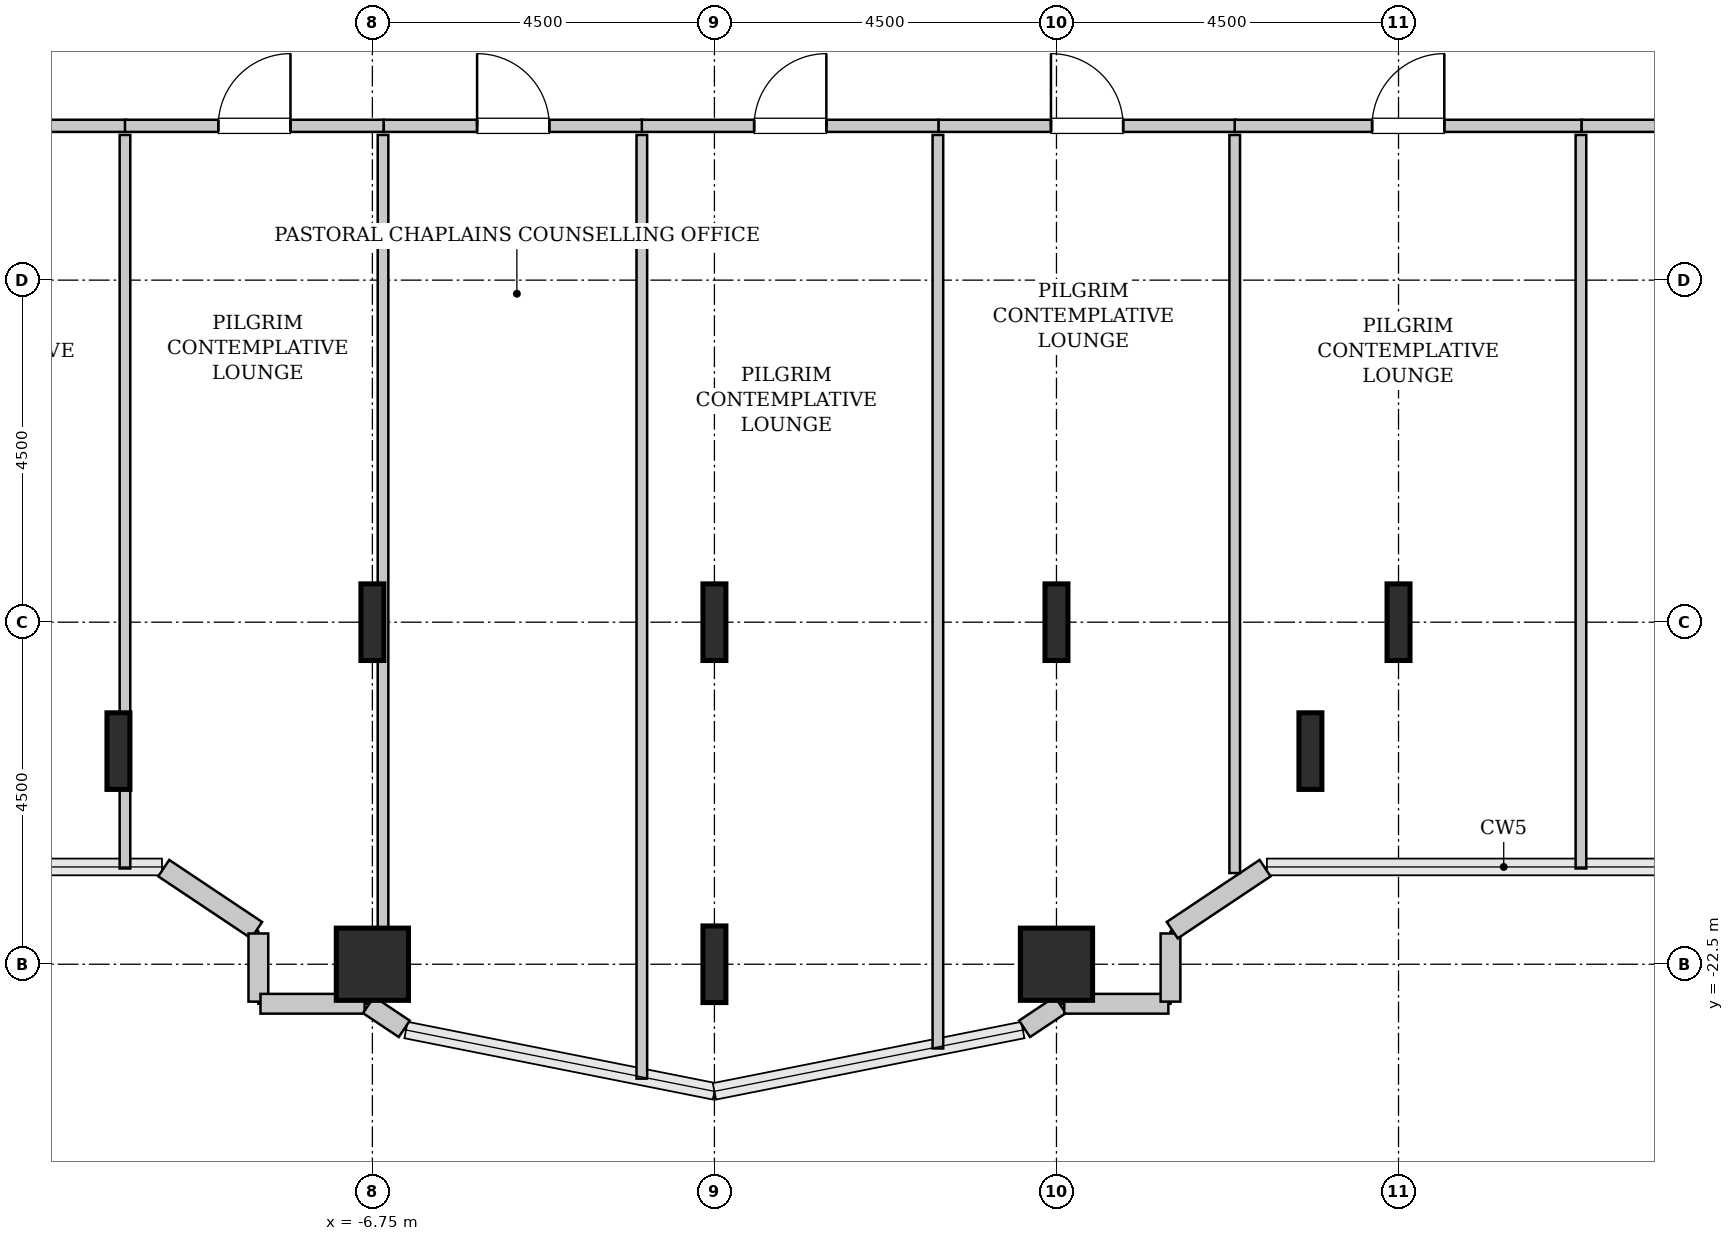
"""IFC4 building model, lengths in metres.
Left out: names, types, materials, properties, quantities, classifications, styles, units other than length and angle.
Written with IfcOpenShell. Run it as: python <this file> out.ifc"""

import sys

from ifc_helpers import new_model, si_unit, direction, frame, frame_2d, origin, origin_2d, place, context, subcontext, project, spatial, rectangle, hollow_rectangle, i_section, extrude, source, transform, mapped, element, fill, save


model = new_model("IFC4")
c1 = context("Model", 3, precision=1e-05, world=origin(), true_north=direction((0.0, 1.0)))
c2 = subcontext(c1, "Body", "Model", "MODEL_VIEW")
j1 = project(units=[si_unit("LENGTHUNIT", "METRE"), si_unit("PLANEANGLEUNIT", "RADIAN")], contexts=[c1])
p1 = place(None, origin())
s1 = spatial("IfcSite", under=j1, at=p1, CompositionType="ELEMENT")
p2 = place(p1, origin())
s2 = spatial("IfcBuilding", under=s1, at=p2, CompositionType="ELEMENT")
p3 = place(p2, frame((0.0, 0.0, 82.4)))
s3 = spatial("IfcBuildingStorey", under=s2, at=p3, CompositionType="ELEMENT", Elevation=82.4)
m1 = source(origin(), c2, "Body", "SweptSolid", [
    extrude(i_section(OverallWidth=0.302, OverallDepth=1.008, WebThickness=0.021, FlangeThickness=0.04, FilletRadius=0.03, at=origin_2d()), origin(), (0.0, 0.0, 1.0), 3.8),
])
p4 = place(p3, frame((-10.091, -19.696, 0.0), z_axis=(0.0, 0.0, 1.0), x_axis=(1.0, 0.0, 0.0)))
e1 = element("IfcColumn", 1, at=p4, inside=s3, PredefinedType="COLUMN", context=c2, shape_type="MappedRepresentation", body=[
    mapped(m1, transform((0.0, 0.0, 0.0), x_axis=(1.0, 0.0, 0.0), y_axis=(0.0, 1.0, 0.0), z_axis=(0.0, 0.0, 1.0), scale=1.0)),
])
m2 = source(origin(), c2, "Body", "SweptSolid", [
    extrude(hollow_rectangle(XDim=0.95, YDim=0.95, WallThickness=0.045, InnerFilletRadius=0.045, OuterFilletRadius=0.09, at=origin_2d()), origin(), (0.0, 0.0, 1.0), 3.8),
])
p5 = place(p3, frame((-6.75, -22.5, 0.0), z_axis=(0.0, 0.0, 1.0), x_axis=(1.0, 0.0, 0.0)))
e2 = element("IfcColumn", 2, at=p5, inside=s3, PredefinedType="COLUMN", context=c2, shape_type="MappedRepresentation", body=[
    mapped(m2, transform((0.0, 0.0, 0.0), x_axis=(1.0, 0.0, 0.0), y_axis=(0.0, 1.0, 0.0), z_axis=(0.0, 0.0, 1.0), scale=1.0)),
])
for number, where, z_axis, x_axis in (
    (3, (-6.75, -18.0, 0.0), (0.0, 0.0, 1.0), (1.0, 0.0, 0.0)),
    (4, (-2.25, -22.5, 0.0), (0.0, 0.0, 1.0), (1.0, 0.0, 0.0)),
    (5, (-2.25, -18.0, 0.0), (0.0, 0.0, 1.0), (1.0, 0.0, 0.0)),
):
    element("IfcColumn", number, at=place(p3, frame(where, z_axis=z_axis, x_axis=x_axis)), inside=s3, PredefinedType="COLUMN", context=c2, shape_type="MappedRepresentation", body=[
        mapped(m1, transform((0.0, 0.0, 0.0), x_axis=(1.0, 0.0, 0.0), y_axis=(0.0, 1.0, 0.0), z_axis=(0.0, 0.0, 1.0), scale=1.0)),
    ])
p6 = place(p3, frame((2.25, -22.5, 0.0), z_axis=(0.0, 0.0, 1.0), x_axis=(1.0, 0.0, 0.0)))
e6 = element("IfcColumn", 6, at=p6, inside=s3, PredefinedType="COLUMN", context=c2, shape_type="MappedRepresentation", body=[
    mapped(m2, transform((0.0, 0.0, 0.0), x_axis=(1.0, 0.0, 0.0), y_axis=(0.0, 1.0, 0.0), z_axis=(0.0, 0.0, 1.0), scale=1.0)),
])
for number, where, z_axis, x_axis in (
    (7, (2.25, -18.0, 0.0), (0.0, 0.0, 1.0), (1.0, 0.0, 0.0)),
    (8, (5.591, -19.696, 0.0), (0.0, 0.0, 1.0), (1.0, 0.0, 0.0)),
    (9, (6.75, -18.0, 0.0), (0.0, 0.0, 1.0), (1.0, 0.0, 0.0)),
):
    element("IfcColumn", number, at=place(p3, frame(where, z_axis=z_axis, x_axis=x_axis)), inside=s3, PredefinedType="COLUMN", context=c2, shape_type="MappedRepresentation", body=[
        mapped(m1, transform((0.0, 0.0, 0.0), x_axis=(1.0, 0.0, 0.0), y_axis=(0.0, 1.0, 0.0), z_axis=(0.0, 0.0, 1.0), scale=1.0)),
    ])
m3 = source(origin(), c2, "Body", "SweptSolid", [
    extrude(rectangle(XDim=1.469, YDim=0.26, at=frame_2d((0.734, 0.0))), origin(), (0.0, 0.0, 1.0), 3.5),
])
p7 = place(p3, frame((-9.495, -21.236, 0.0), z_axis=(0.0, 0.0, 1.0), x_axis=(0.831461760506, -0.555581983884, 0.0)))
e10 = element("IfcWall", 10, at=p7, inside=s3, PredefinedType="SOLIDWALL", context=c2, shape_type="MappedRepresentation", body=[
    mapped(m3, transform((0.0, 0.0, 0.0), x_axis=(1.0, 0.0, 0.0), y_axis=(0.0, 1.0, 0.0), z_axis=(0.0, 0.0, 1.0), scale=1.0)),
])
m4 = source(origin(), c2, "Body", "SweptSolid", [
    extrude(rectangle(XDim=0.897, YDim=0.26, at=frame_2d((0.448, 0.0))), origin(), (0.0, 0.0, 1.0), 3.5),
])
p8 = place(p3, frame((-8.25, -22.095, 0.0), z_axis=(0.0, 0.0, 1.0), x_axis=(0.0, -1.0, 0.0)))
e11 = element("IfcWall", 11, at=p8, inside=s3, PredefinedType="SOLIDWALL", context=c2, shape_type="MappedRepresentation", body=[
    mapped(m4, transform((0.0, 0.0, 0.0), x_axis=(1.0, 0.0, 0.0), y_axis=(0.0, 1.0, 0.0), z_axis=(0.0, 0.0, 1.0), scale=1.0)),
])
m5 = source(origin(), c2, "Body", "SweptSolid", [
    extrude(rectangle(XDim=1.37, YDim=0.26, at=frame_2d((0.685, 0.0))), origin(), (0.0, 0.0, 1.0), 3.5),
])
p9 = place(p3, frame((-8.222, -23.02, 0.0), z_axis=(0.0, 0.0, 1.0), x_axis=(1.0, 0.0, 0.0)))
e12 = element("IfcWall", 12, at=p9, inside=s3, PredefinedType="SOLIDWALL", context=c2, shape_type="MappedRepresentation", body=[
    mapped(m5, transform((0.0, 0.0, 0.0), x_axis=(1.0, 0.0, 0.0), y_axis=(0.0, 1.0, 0.0), z_axis=(0.0, 0.0, 1.0), scale=1.0)),
])
m6 = source(origin(), c2, "Body", "SweptSolid", [
    extrude(rectangle(XDim=0.565, YDim=0.26, at=frame_2d((0.283, 0.0))), origin(), (0.0, 0.0, 1.0), 3.5),
])
for number, where, z_axis, x_axis in (
    (13, (-6.801, -23.036, 0.0), (0.0, 0.0, 1.0), (0.832, -0.555, 0.0)),
    (14, (1.831, -23.35, 0.0), (0.0, 0.0, 1.0), (0.832, 0.555, 0.0)),
):
    element("IfcWall", number, at=place(p3, frame(where, z_axis=z_axis, x_axis=x_axis)), inside=s3, PredefinedType="SOLIDWALL", context=c2, shape_type="MappedRepresentation", body=[
        mapped(m6, transform((0.0, 0.0, 0.0), x_axis=(1.0, 0.0, 0.0), y_axis=(0.0, 1.0, 0.0), z_axis=(0.0, 0.0, 1.0), scale=1.0)),
    ])
p10 = place(p3, frame((2.352, -23.02, 0.0), z_axis=(0.0, 0.0, 1.0), x_axis=(1.0, 0.0, 0.0)))
e15 = element("IfcWall", 15, at=p10, inside=s3, PredefinedType="SOLIDWALL", context=c2, shape_type="MappedRepresentation", body=[
    mapped(m5, transform((0.0, 0.0, 0.0), x_axis=(1.0, 0.0, 0.0), y_axis=(0.0, 1.0, 0.0), z_axis=(0.0, 0.0, 1.0), scale=1.0)),
])
p11 = place(p3, frame((3.75, -22.992, 0.0), z_axis=(0.0, 0.0, 1.0), x_axis=(0.0, 1.0, 0.0)))
e16 = element("IfcWall", 16, at=p11, inside=s3, PredefinedType="SOLIDWALL", context=c2, shape_type="MappedRepresentation", body=[
    mapped(m4, transform((0.0, 0.0, 0.0), x_axis=(1.0, 0.0, 0.0), y_axis=(0.0, 1.0, 0.0), z_axis=(0.0, 0.0, 1.0), scale=1.0)),
])
p12 = place(p3, frame((3.773, -22.052, 0.0), z_axis=(0.0, 0.0, 1.0), x_axis=(0.831461760506, 0.555581983884, 0.0)))
e17 = element("IfcWall", 17, at=p12, inside=s3, PredefinedType="SOLIDWALL", context=c2, shape_type="MappedRepresentation", body=[
    mapped(m3, transform((0.0, 0.0, 0.0), x_axis=(1.0, 0.0, 0.0), y_axis=(0.0, 1.0, 0.0), z_axis=(0.0, 0.0, 1.0), scale=1.0)),
])
m7 = source(origin(), c2, "Body", "SweptSolid", [
    extrude(rectangle(XDim=3.625, YDim=0.16, at=frame_2d((1.812, 0.0))), origin(), (0.0, 0.0, 1.0), 3.485),
])
p13 = place(p3, frame((-13.62, -11.47, 0.0), z_axis=(0.0, 0.0, 1.0), x_axis=(1.0, 0.0, 0.0)))
e18 = element("IfcWall", 18, at=p13, inside=s3, PredefinedType="PARTITIONING", context=c2, shape_type="MappedRepresentation", body=[
    mapped(m7, transform((0.0, 0.0, 0.0), x_axis=(1.0, 0.0, 0.0), y_axis=(0.0, 1.0, 0.0), z_axis=(0.0, 0.0, 1.0), scale=1.0)),
])
p14 = place(p13, frame((1.337, 0.0, 0.0)))
e19 = element("IfcOpeningElement", 19, at=p14, cuts=e18, PredefinedType="OPENING", context=c2, shape_type="SweptSolid", body=[
    extrude(rectangle(XDim=0.95, YDim=2.1, at=frame_2d((0.475, 1.05))), frame((0.0, 0.09, 0.0), z_axis=(0.0, -1.0, 0.0), x_axis=(1.0, 0.0, 0.0)), (0.0, 0.0, 1.0), 0.18),
])
m8 = source(origin(), c2, "Body", "SweptSolid", [
    extrude(rectangle(XDim=9.65, YDim=0.14, at=frame_2d((4.825, 0.0))), origin(), (0.0, 0.0, 1.0), 3.485),
])
p15 = place(p3, frame((-10.005, -21.24, 0.0), z_axis=(0.0, 0.0, 1.0), x_axis=(0.0, 1.0, 0.0)))
e20 = element("IfcWall", 20, at=p15, inside=s3, PredefinedType="PARTITIONING", context=c2, shape_type="MappedRepresentation", body=[
    mapped(m8, transform((0.0, 0.0, 0.0), x_axis=(1.0, 0.0, 0.0), y_axis=(0.0, 1.0, 0.0), z_axis=(0.0, 0.0, 1.0), scale=1.0)),
])
m9 = source(origin(), c2, "Body", "SweptSolid", [
    extrude(rectangle(XDim=3.405, YDim=0.16, at=frame_2d((1.702, 0.0))), origin(), (0.0, 0.0, 1.0), 3.485),
])
p16 = place(p3, frame((-10.005, -11.47, 0.0), z_axis=(0.0, 0.0, 1.0), x_axis=(1.0, 0.0, 0.0)))
e21 = element("IfcWall", 21, at=p16, inside=s3, PredefinedType="PARTITIONING", context=c2, shape_type="MappedRepresentation", body=[
    mapped(m9, transform((0.0, 0.0, 0.0), x_axis=(1.0, 0.0, 0.0), y_axis=(0.0, 1.0, 0.0), z_axis=(0.0, 0.0, 1.0), scale=1.0)),
])
p17 = place(p16, frame((1.228, 0.0, 0.0)))
e22 = element("IfcOpeningElement", 22, at=p17, cuts=e21, PredefinedType="OPENING", context=c2, shape_type="SweptSolid", body=[
    extrude(rectangle(XDim=0.95, YDim=2.1, at=frame_2d((0.475, 1.05))), frame((0.0, 0.09, 0.0), z_axis=(0.0, -1.0, 0.0), x_axis=(1.0, 0.0, 0.0)), (0.0, 0.0, 1.0), 0.18),
])
m10 = source(origin(), c2, "Body", "SweptSolid", [
    extrude(rectangle(XDim=11.371, YDim=0.14, at=frame_2d((5.686, 0.0))), origin(), (0.0, 0.0, 1.0), 2.775),
])
p18 = place(p3, frame((-6.61, -22.961, 0.0), z_axis=(0.0, 0.0, 1.0), x_axis=(0.0, 1.0, 0.0)))
e23 = element("IfcWall", 23, at=p18, inside=s3, PredefinedType="PARTITIONING", context=c2, shape_type="MappedRepresentation", body=[
    mapped(m10, transform((0.0, 0.0, 0.0), x_axis=(1.0, 0.0, 0.0), y_axis=(0.0, 1.0, 0.0), z_axis=(0.0, 0.0, 1.0), scale=1.0)),
])
m11 = source(origin(), c2, "Body", "SweptSolid", [
    extrude(rectangle(XDim=3.405, YDim=0.16, at=frame_2d((1.703, 0.0))), origin(), (0.0, 0.0, 1.0), 3.485),
])
p19 = place(p3, frame((-6.6, -11.47, 0.0), z_axis=(0.0, 0.0, 1.0), x_axis=(1.0, 0.0, 0.0)))
e24 = element("IfcWall", 24, at=p19, inside=s3, PredefinedType="PARTITIONING", context=c2, shape_type="MappedRepresentation", body=[
    mapped(m11, transform((0.0, 0.0, 0.0), x_axis=(1.0, 0.0, 0.0), y_axis=(0.0, 1.0, 0.0), z_axis=(0.0, 0.0, 1.0), scale=1.0)),
])
p20 = place(p19, frame((1.228, 0.0, 0.0)))
e25 = element("IfcOpeningElement", 25, at=p20, cuts=e24, PredefinedType="OPENING", context=c2, shape_type="SweptSolid", body=[
    extrude(rectangle(XDim=0.95, YDim=2.1, at=frame_2d((0.475, 1.05))), frame((0.0, 0.09, 0.0), z_axis=(0.0, -1.0, 0.0), x_axis=(1.0, 0.0, 0.0)), (0.0, 0.0, 1.0), 0.18),
])
m12 = source(origin(), c2, "Body", "SweptSolid", [
    extrude(rectangle(XDim=12.415, YDim=0.14, at=frame_2d((6.208, 0.0))), origin(), (0.0, 0.0, 1.0), 3.485),
])
p21 = place(p3, frame((-3.205, -24.005, 0.0), z_axis=(0.0, 0.0, 1.0), x_axis=(0.0, 1.0, 0.0)))
e26 = element("IfcWall", 26, at=p21, inside=s3, PredefinedType="PARTITIONING", context=c2, shape_type="MappedRepresentation", body=[
    mapped(m12, transform((0.0, 0.0, 0.0), x_axis=(1.0, 0.0, 0.0), y_axis=(0.0, 1.0, 0.0), z_axis=(0.0, 0.0, 1.0), scale=1.0)),
])
m13 = source(origin(), c2, "Body", "SweptSolid", [
    extrude(rectangle(XDim=3.905, YDim=0.16, at=frame_2d((1.953, 0.0))), origin(), (0.0, 0.0, 1.0), 3.485),
])
p22 = place(p3, frame((-3.205, -11.47, 0.0), z_axis=(0.0, 0.0, 1.0), x_axis=(1.0, 0.0, 0.0)))
e27 = element("IfcWall", 27, at=p22, inside=s3, PredefinedType="PARTITIONING", context=c2, shape_type="MappedRepresentation", body=[
    mapped(m13, transform((0.0, 0.0, 0.0), x_axis=(1.0, 0.0, 0.0), y_axis=(0.0, 1.0, 0.0), z_axis=(0.0, 0.0, 1.0), scale=1.0)),
])
p23 = place(p22, frame((1.478, 0.0, 0.0)))
e28 = element("IfcOpeningElement", 28, at=p23, cuts=e27, PredefinedType="OPENING", context=c2, shape_type="SweptSolid", body=[
    extrude(rectangle(XDim=0.95, YDim=2.1, at=frame_2d((0.475, 1.05))), frame((0.0, 0.09, 0.0), z_axis=(0.0, -1.0, 0.0), x_axis=(1.0, 0.0, 0.0)), (0.0, 0.0, 1.0), 0.18),
])
m14 = source(origin(), c2, "Body", "SweptSolid", [
    extrude(rectangle(XDim=12.018, YDim=0.14, at=frame_2d((6.009, 0.0))), origin(), (0.0, 0.0, 1.0), 3.485),
])
p24 = place(p3, frame((0.69, -23.608, 0.0), z_axis=(0.0, 0.0, 1.0), x_axis=(0.0, 1.0, 0.0)))
e29 = element("IfcWall", 29, at=p24, inside=s3, PredefinedType="PARTITIONING", context=c2, shape_type="MappedRepresentation", body=[
    mapped(m14, transform((0.0, 0.0, 0.0), x_axis=(1.0, 0.0, 0.0), y_axis=(0.0, 1.0, 0.0), z_axis=(0.0, 0.0, 1.0), scale=1.0)),
])
p25 = place(p3, frame((0.7, -11.47, 0.0), z_axis=(0.0, 0.0, 1.0), x_axis=(1.0, 0.0, 0.0)))
e30 = element("IfcWall", 30, at=p25, inside=s3, PredefinedType="PARTITIONING", context=c2, shape_type="MappedRepresentation", body=[
    mapped(m13, transform((0.0, 0.0, 0.0), x_axis=(1.0, 0.0, 0.0), y_axis=(0.0, 1.0, 0.0), z_axis=(0.0, 0.0, 1.0), scale=1.0)),
])
p26 = place(p25, frame((1.478, 0.0, 0.0)))
e31 = element("IfcOpeningElement", 31, at=p26, cuts=e30, PredefinedType="OPENING", context=c2, shape_type="SweptSolid", body=[
    extrude(rectangle(XDim=0.95, YDim=2.1, at=frame_2d((0.475, 1.05))), frame((0.0, 0.09, 0.0), z_axis=(0.0, -1.0, 0.0), x_axis=(1.0, 0.0, 0.0)), (0.0, 0.0, 1.0), 0.18),
])
m15 = source(origin(), c2, "Body", "SweptSolid", [
    extrude(rectangle(XDim=9.71, YDim=0.14, at=frame_2d((4.855, 0.0))), origin(), (0.0, 0.0, 1.0), 3.485),
])
p27 = place(p3, frame((4.595, -21.301, 0.0), z_axis=(0.0, 0.0, 1.0), x_axis=(0.0, 1.0, 0.0)))
e32 = element("IfcWall", 32, at=p27, inside=s3, PredefinedType="PARTITIONING", context=c2, shape_type="MappedRepresentation", body=[
    mapped(m15, transform((0.0, 0.0, 0.0), x_axis=(1.0, 0.0, 0.0), y_axis=(0.0, 1.0, 0.0), z_axis=(0.0, 0.0, 1.0), scale=1.0)),
])
m16 = source(origin(), c2, "Body", "SweptSolid", [
    extrude(rectangle(XDim=4.565, YDim=0.16, at=frame_2d((2.282, 0.0))), origin(), (0.0, 0.0, 1.0), 3.485),
])
p28 = place(p3, frame((4.595, -11.47, 0.0), z_axis=(0.0, 0.0, 1.0), x_axis=(1.0, 0.0, 0.0)))
e33 = element("IfcWall", 33, at=p28, inside=s3, PredefinedType="PARTITIONING", context=c2, shape_type="MappedRepresentation", body=[
    mapped(m16, transform((0.0, 0.0, 0.0), x_axis=(1.0, 0.0, 0.0), y_axis=(0.0, 1.0, 0.0), z_axis=(0.0, 0.0, 1.0), scale=1.0)),
])
p29 = place(p28, frame((1.808, 0.0, 0.0)))
e34 = element("IfcOpeningElement", 34, at=p29, cuts=e33, PredefinedType="OPENING", context=c2, shape_type="SweptSolid", body=[
    extrude(rectangle(XDim=0.95, YDim=2.1, at=frame_2d((0.475, 1.05))), frame((0.0, 0.09, 0.0), z_axis=(0.0, -1.0, 0.0), x_axis=(1.0, 0.0, 0.0)), (0.0, 0.0, 1.0), 0.18),
])
p30 = place(p3, frame((9.15, -21.24, 0.0), z_axis=(0.0, 0.0, 1.0), x_axis=(0.0, 1.0, 0.0)))
e35 = element("IfcWall", 35, at=p30, inside=s3, PredefinedType="PARTITIONING", context=c2, shape_type="MappedRepresentation", body=[
    mapped(m8, transform((0.0, 0.0, 0.0), x_axis=(1.0, 0.0, 0.0), y_axis=(0.0, 1.0, 0.0), z_axis=(0.0, 0.0, 1.0), scale=1.0)),
])
m17 = source(origin(), c2, "Body", "SweptSolid", [
    extrude(rectangle(XDim=4.46, YDim=0.16, at=frame_2d((2.23, 0.0))), origin(), (0.0, 0.0, 1.0), 3.485),
])
p31 = place(p3, frame((9.16, -11.47, 0.0), z_axis=(0.0, 0.0, 1.0), x_axis=(1.0, 0.0, 0.0)))
e36 = element("IfcWall", 36, at=p31, inside=s3, PredefinedType="PARTITIONING", context=c2, shape_type="MappedRepresentation", body=[
    mapped(m17, transform((0.0, 0.0, 0.0), x_axis=(1.0, 0.0, 0.0), y_axis=(0.0, 1.0, 0.0), z_axis=(0.0, 0.0, 1.0), scale=1.0)),
])
p32 = place(p31, frame((1.755, 0.0, 0.0)))
e37 = element("IfcOpeningElement", 37, at=p32, cuts=e36, PredefinedType="OPENING", context=c2, shape_type="SweptSolid", body=[
    extrude(rectangle(XDim=0.95, YDim=2.1, at=frame_2d((0.475, 1.05))), frame((0.0, 0.09, 0.0), z_axis=(0.0, -1.0, 0.0), x_axis=(1.0, 0.0, 0.0)), (0.0, 0.0, 1.0), 0.18),
])
m18 = source(origin(), c2, "Body", "SweptSolid", [
    extrude(rectangle(XDim=0.95, YDim=2.1, at=frame_2d((0.475, 1.05))), frame((0.0, 0.025, 0.0), z_axis=(0.0, -1.0, 0.0), x_axis=(1.0, 0.0, 0.0)), (0.0, 0.0, 1.0), 0.05),
])
p33 = place(p17, origin())
e38 = element("IfcDoor", 38, at=p33, inside=s3, OperationType="SINGLE_SWING_RIGHT", PredefinedType="DOOR", context=c2, shape_type="MappedRepresentation", body=[
    mapped(m18, transform((0.0, 0.0, 0.0), x_axis=(1.0, 0.0, 0.0), y_axis=(0.0, 1.0, 0.0), z_axis=(0.0, 0.0, 1.0), scale=1.0)),
])
fill(e22, e38)
p34 = place(p20, origin())
e39 = element("IfcDoor", 39, at=p34, inside=s3, OperationType="SINGLE_SWING_LEFT", PredefinedType="DOOR", context=c2, shape_type="MappedRepresentation", body=[
    mapped(m18, transform((0.0, 0.0, 0.0), x_axis=(1.0, 0.0, 0.0), y_axis=(0.0, 1.0, 0.0), z_axis=(0.0, 0.0, 1.0), scale=1.0)),
])
fill(e25, e39)
p35 = place(p23, origin())
e40 = element("IfcDoor", 40, at=p35, inside=s3, OperationType="SINGLE_SWING_RIGHT", PredefinedType="DOOR", context=c2, shape_type="MappedRepresentation", body=[
    mapped(m18, transform((0.0, 0.0, 0.0), x_axis=(1.0, 0.0, 0.0), y_axis=(0.0, 1.0, 0.0), z_axis=(0.0, 0.0, 1.0), scale=1.0)),
])
fill(e28, e40)
p36 = place(p26, origin())
e41 = element("IfcDoor", 41, at=p36, inside=s3, OperationType="SINGLE_SWING_LEFT", PredefinedType="DOOR", context=c2, shape_type="MappedRepresentation", body=[
    mapped(m18, transform((0.0, 0.0, 0.0), x_axis=(1.0, 0.0, 0.0), y_axis=(0.0, 1.0, 0.0), z_axis=(0.0, 0.0, 1.0), scale=1.0)),
])
fill(e31, e41)
p37 = place(p29, origin())
e42 = element("IfcDoor", 42, at=p37, inside=s3, OperationType="SINGLE_SWING_RIGHT", PredefinedType="DOOR", context=c2, shape_type="MappedRepresentation", body=[
    mapped(m18, transform((0.0, 0.0, 0.0), x_axis=(1.0, 0.0, 0.0), y_axis=(0.0, 1.0, 0.0), z_axis=(0.0, 0.0, 1.0), scale=1.0)),
])
fill(e34, e42)
save(model, sys.argv[1])
